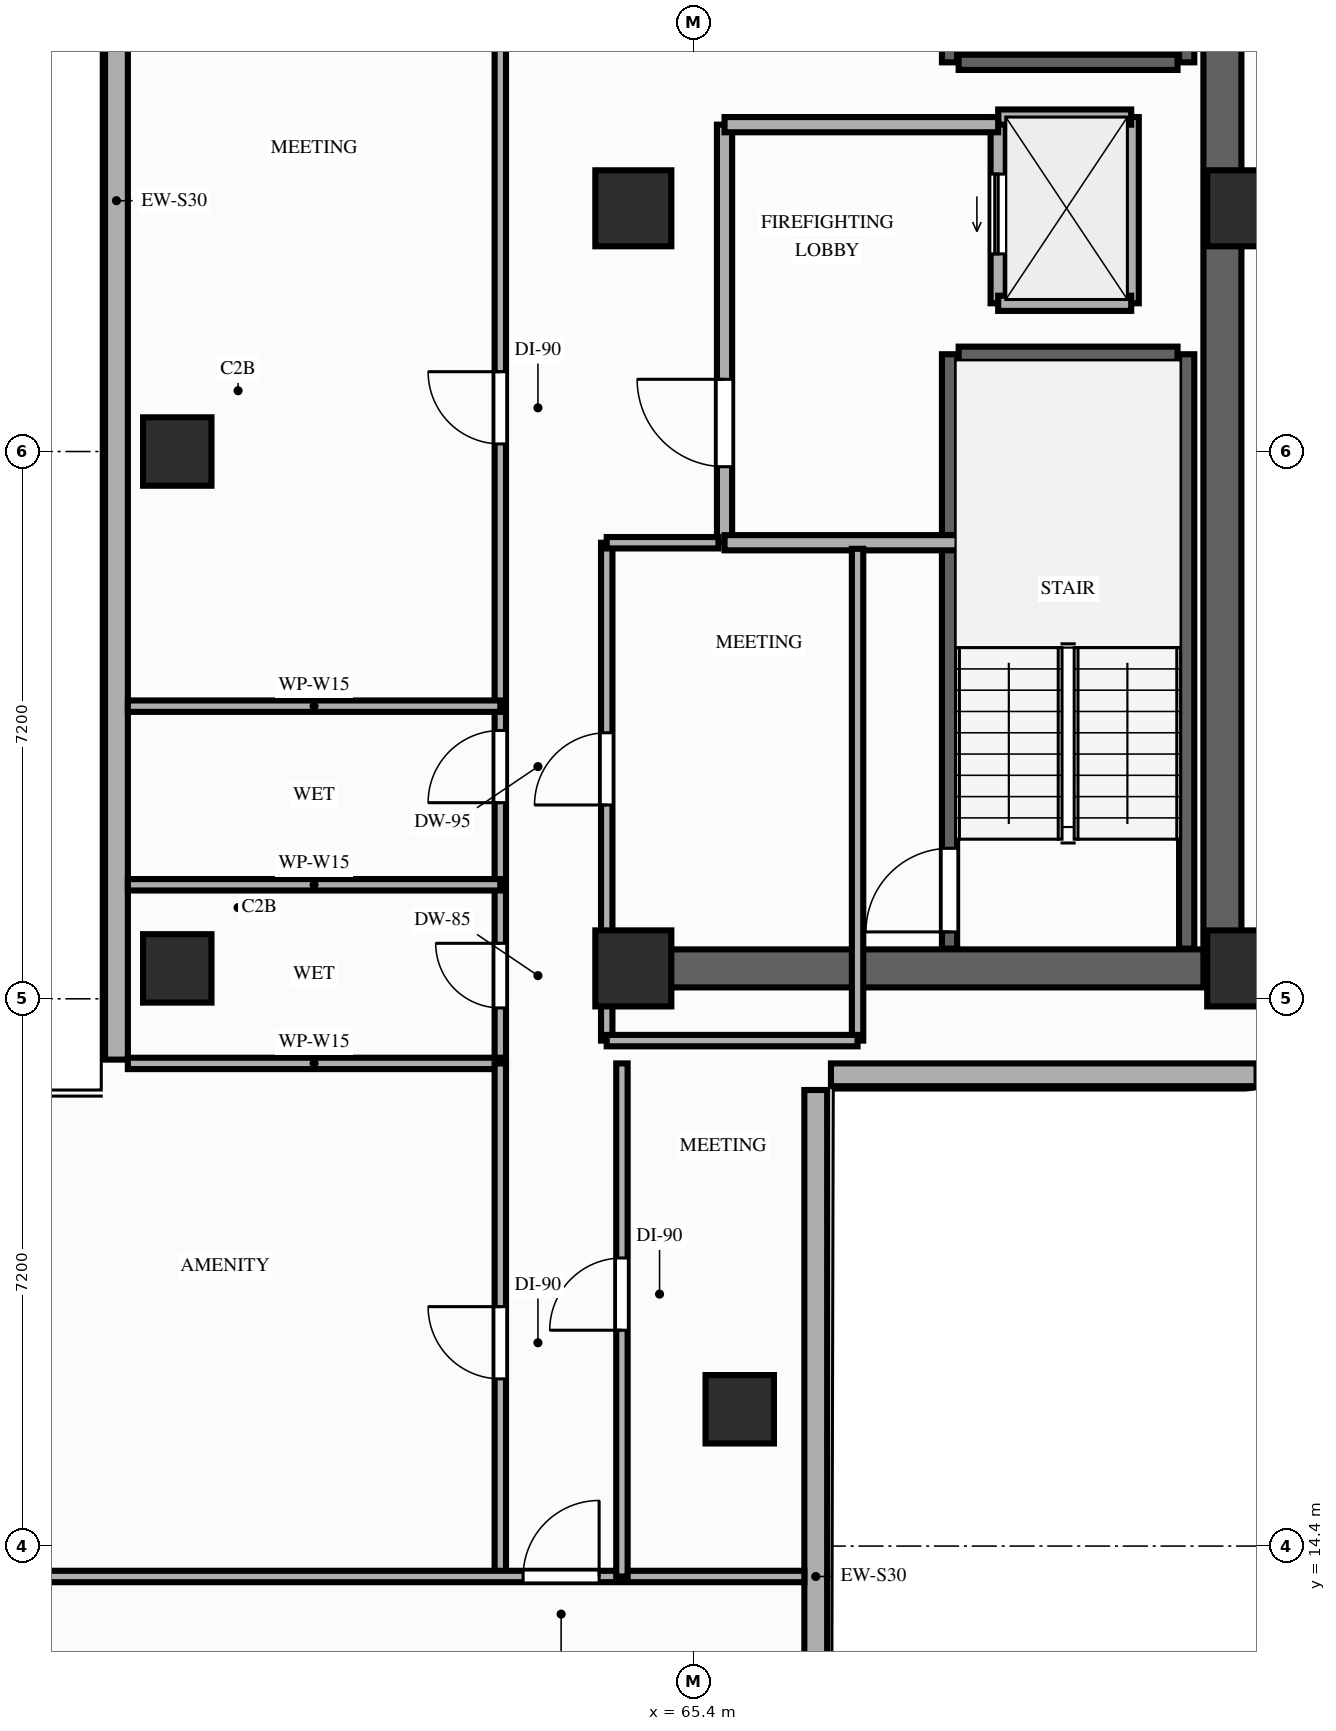
"""IFC4 building model, lengths in metres.
Left out: names, types, materials, properties, quantities, classifications, styles, units other than length and angle.
Written with IfcOpenShell. Run it as: python <this file> out.ifc"""

import sys

from ifc_helpers import new_model, si_unit, direction, frame, frame_2d, origin, origin_2d, place, context, subcontext, project, spatial, rectangle, extrude, element, fill, save


model = new_model("IFC4")
c1 = context("Model", 3, precision=1e-05, world=origin(), true_north=direction((0.0, 1.0)))
c2 = subcontext(c1, "Body", "Model", "MODEL_VIEW")
j1 = project(units=[si_unit("LENGTHUNIT", "METRE"), si_unit("PLANEANGLEUNIT", "RADIAN")], contexts=[c1])
p1 = place(None, origin())
s1 = spatial("IfcSite", under=j1, at=p1, CompositionType="ELEMENT")
p2 = place(p1, origin())
s2 = spatial("IfcBuilding", under=s1, at=p2, CompositionType="ELEMENT")
p3 = place(p2, frame((0.0, 0.0, 69.2)))
s3 = spatial("IfcBuildingStorey", under=s2, at=p3, CompositionType="ELEMENT", Elevation=69.2)
for number, where, z_axis, x_axis in (
    (1, (64.6, 22.0, 0.0), (0.0, 0.0, 1.0), (1.0, 0.0, 0.0)),
    (2, (72.65, 22.0, 0.0), (0.0, 0.0, 1.0), (1.0, 0.0, 0.0)),
    (3, (64.6, 32.0, 0.0), (0.0, 0.0, 1.0), (1.0, 0.0, 0.0)),
    (4, (72.65, 32.0, 0.0), (0.0, 0.0, 1.0), (1.0, 0.0, 0.0)),
):
    element("IfcColumn", number, at=place(p3, frame(where, z_axis=z_axis, x_axis=x_axis)), inside=s3, PredefinedType="COLUMN", context=c2, shape_type="SweptSolid", body=[
        extrude(rectangle(XDim=1.0, YDim=1.0, at=origin_2d()), origin(), (0.0, 0.0, 1.0), 3.2),
    ])
for number, where, z_axis, x_axis in (
    (5, (58.6, 22.0, 0.0), (0.0, 0.0, 1.0), (1.0, 0.0, 0.0)),
    (6, (58.6, 28.8, 0.0), (0.0, 0.0, 1.0), (1.0, 0.0, 0.0)),
    (7, (66.0, 16.2, 0.0), (0.0, 0.0, 1.0), (1.0, 0.0, 0.0)),
):
    element("IfcColumn", number, at=place(p3, frame(where, z_axis=z_axis, x_axis=x_axis)), inside=s3, PredefinedType="COLUMN", context=c2, shape_type="SweptSolid", body=[
        extrude(rectangle(XDim=0.9, YDim=0.9, at=origin_2d()), origin(), (0.0, 0.0, 1.0), 3.2),
    ])
p4 = place(p3, frame((57.8, 43.4, 0.0), z_axis=(0.0, 0.0, 1.0), x_axis=(0.0, -1.0, 0.0)))
e8 = element("IfcWall", 8, at=p4, inside=s3, PredefinedType="STANDARD", context=c2, shape_type="SweptSolid", body=[
    extrude(rectangle(XDim=22.6, YDim=0.3, at=frame_2d((11.3, 0.0))), origin(), (0.0, 0.0, 1.0), 2.6),
])
p5 = place(p4, frame((3.6, 0.0, 0.85)))
e9 = element("IfcOpeningElement", 9, at=p5, cuts=e8, PredefinedType="OPENING", context=c2, shape_type="SweptSolid", body=[
    extrude(rectangle(XDim=1.6, YDim=1.45, at=frame_2d((0.8, 0.725))), frame((0.0, 0.16, 0.0), z_axis=(0.0, -1.0, 0.0), x_axis=(1.0, 0.0, 0.0)), (0.0, 0.0, 1.0), 0.32),
])
p6 = place(p3, frame((67.0, 7.6, 0.0), z_axis=(0.0, 0.0, 1.0), x_axis=(0.0, 1.0, 0.0)))
e10 = element("IfcWall", 10, at=p6, inside=s3, PredefinedType="STANDARD", context=c2, shape_type="SweptSolid", body=[
    extrude(rectangle(XDim=12.8, YDim=0.3, at=frame_2d((6.4, 0.0))), origin(), (0.0, 0.0, 1.0), 3.02),
])
p7 = place(p3, frame((67.2, 20.6, 0.0), z_axis=(0.0, 0.0, 1.0), x_axis=(1.0, 0.0, 0.0)))
e11 = element("IfcWall", 11, at=p7, inside=s3, PredefinedType="STANDARD", context=c2, shape_type="SweptSolid", body=[
    extrude(rectangle(XDim=5.6, YDim=0.3, at=frame_2d((2.8, 0.0))), origin(), (0.0, 0.0, 1.0), 3.02),
])
p8 = place(p3, frame((72.35, 22.0, 0.0), z_axis=(0.0, 0.0, 1.0), x_axis=(0.0, 1.0, 0.0)))
e12 = element("IfcWall", 12, at=p8, inside=s3, PredefinedType="SHEAR", context=c2, shape_type="SweptSolid", body=[
    extrude(rectangle(XDim=20.25, YDim=0.5, at=frame_2d((10.125, 0.0))), origin(), (0.0, 0.0, 1.0), 3.02),
])
p9 = place(p3, frame((64.6, 22.0, 0.0), z_axis=(0.0, 0.0, 1.0), x_axis=(1.0, 0.0, 0.0)))
e13 = element("IfcWall", 13, at=p9, inside=s3, PredefinedType="SHEAR", context=c2, shape_type="SweptSolid", body=[
    extrude(rectangle(XDim=7.5, YDim=0.5, at=frame_2d((3.75, 0.0))), origin(), (0.0, 0.0, 1.0), 3.02),
])
p10 = place(p3, frame((68.76, 22.26, 0.0), z_axis=(0.0, 0.0, 1.0), x_axis=(0.0, 1.0, 0.0)))
e14 = element("IfcWall", 14, at=p10, inside=s3, PredefinedType="SHEAR", context=c2, shape_type="SweptSolid", body=[
    extrude(rectangle(XDim=7.82, YDim=0.2, at=frame_2d((3.91, 0.0))), origin(), (0.0, 0.0, 1.0), 3.02),
])
p11 = place(p10, frame((0.22, 0.0, 0.0)))
e15 = element("IfcOpeningElement", 15, at=p11, cuts=e14, PredefinedType="OPENING", context=c2, shape_type="SweptSolid", body=[
    extrude(rectangle(XDim=1.1, YDim=2.15, at=frame_2d((0.55, 1.075))), frame((0.0, 0.11, 0.0), z_axis=(0.0, -1.0, 0.0), x_axis=(1.0, 0.0, 0.0)), (0.0, 0.0, 1.0), 0.22),
])
p12 = place(p3, frame((71.88, 22.26, 0.0), z_axis=(0.0, 0.0, 1.0), x_axis=(0.0, 1.0, 0.0)))
e16 = element("IfcWall", 16, at=p12, inside=s3, PredefinedType="SHEAR", context=c2, shape_type="SweptSolid", body=[
    extrude(rectangle(XDim=7.82, YDim=0.2, at=frame_2d((3.91, 0.0))), origin(), (0.0, 0.0, 1.0), 3.02),
])
p13 = place(p3, frame((68.88, 30.08, 0.0), z_axis=(0.0, 0.0, 1.0), x_axis=(1.0, 0.0, 0.0)))
e17 = element("IfcWall", 17, at=p13, inside=s3, PredefinedType="SHEAR", context=c2, shape_type="SweptSolid", body=[
    extrude(rectangle(XDim=2.88, YDim=0.2, at=frame_2d((1.44, 0.0))), origin(), (0.0, 0.0, 1.0), 3.02),
])
p14 = place(p3, frame((68.76, 33.92, 0.0), z_axis=(0.0, 0.0, 1.0), x_axis=(0.0, 1.0, 0.0)))
e18 = element("IfcWall", 18, at=p14, inside=s3, PredefinedType="SHEAR", context=c2, shape_type="SweptSolid", body=[
    extrude(rectangle(XDim=7.96, YDim=0.2, at=frame_2d((3.98, 0.0))), origin(), (0.0, 0.0, 1.0), 3.02),
])
p15 = place(p14, frame((0.22, 0.0, 0.0)))
e19 = element("IfcOpeningElement", 19, at=p15, cuts=e18, PredefinedType="OPENING", context=c2, shape_type="SweptSolid", body=[
    extrude(rectangle(XDim=1.1, YDim=2.15, at=frame_2d((0.55, 1.075))), frame((0.0, 0.11, 0.0), z_axis=(0.0, -1.0, 0.0), x_axis=(1.0, 0.0, 0.0)), (0.0, 0.0, 1.0), 0.22),
])
p16 = place(p3, frame((71.88, 33.92, 0.0), z_axis=(0.0, 0.0, 1.0), x_axis=(0.0, 1.0, 0.0)))
e20 = element("IfcWall", 20, at=p16, inside=s3, PredefinedType="SHEAR", context=c2, shape_type="SweptSolid", body=[
    extrude(rectangle(XDim=7.96, YDim=0.2, at=frame_2d((3.98, 0.0))), origin(), (0.0, 0.0, 1.0), 3.02),
])
p17 = place(p3, frame((68.88, 33.92, 0.0), z_axis=(0.0, 0.0, 1.0), x_axis=(1.0, 0.0, 0.0)))
e21 = element("IfcWall", 21, at=p17, inside=s3, PredefinedType="SHEAR", context=c2, shape_type="SweptSolid", body=[
    extrude(rectangle(XDim=2.88, YDim=0.2, at=frame_2d((1.44, 0.0))), origin(), (0.0, 0.0, 1.0), 3.02),
])
p18 = place(p3, frame((69.4, 30.75, 0.0), z_axis=(0.0, 0.0, 1.0), x_axis=(0.0, 1.0, 0.0)))
e22 = element("IfcWall", 22, at=p18, inside=s3, PredefinedType="MOVABLE", context=c2, shape_type="SweptSolid", body=[
    extrude(rectangle(XDim=2.45, YDim=0.2, at=frame_2d((1.225, 0.0))), origin(), (0.0, 0.0, 1.0), 3.02),
])
p19 = place(p18, frame((0.65, 0.0, 0.0)))
e23 = element("IfcOpeningElement", 23, at=p19, cuts=e22, PredefinedType="OPENING", context=c2, shape_type="SweptSolid", body=[
    extrude(rectangle(XDim=1.05, YDim=2.15, at=frame_2d((0.525, 1.075))), frame((0.0, 0.11, 0.0), z_axis=(0.0, -1.0, 0.0), x_axis=(1.0, 0.0, 0.0)), (0.0, 0.0, 1.0), 0.22),
])
p20 = place(p3, frame((71.15, 30.75, 0.0), z_axis=(0.0, 0.0, 1.0), x_axis=(0.0, 1.0, 0.0)))
e24 = element("IfcWall", 24, at=p20, inside=s3, PredefinedType="MOVABLE", context=c2, shape_type="SweptSolid", body=[
    extrude(rectangle(XDim=2.45, YDim=0.2, at=frame_2d((1.225, 0.0))), origin(), (0.0, 0.0, 1.0), 3.02),
])
for number, where, z_axis, x_axis in (
    (25, (69.4, 33.2, 0.0), (0.0, 0.0, 1.0), (1.0, 0.0, 0.0)),
    (26, (69.4, 30.75, 0.0), (0.0, 0.0, 1.0), (1.0, 0.0, 0.0)),
):
    element("IfcWall", number, at=place(p3, frame(where, z_axis=z_axis, x_axis=x_axis)), inside=s3, PredefinedType="MOVABLE", context=c2, shape_type="SweptSolid", body=[
        extrude(rectangle(XDim=1.75, YDim=0.2, at=frame_2d((0.875, 0.0))), origin(), (0.0, 0.0, 1.0), 3.02),
    ])
p21 = place(p3, frame((65.8, 27.6, 0.0), z_axis=(0.0, 0.0, 1.0), x_axis=(0.0, 1.0, 0.0)))
e27 = element("IfcWall", 27, at=p21, inside=s3, PredefinedType="PARTITIONING", context=c2, shape_type="SweptSolid", body=[
    extrude(rectangle(XDim=5.5, YDim=0.2, at=frame_2d((2.75, 0.0))), origin(), (0.0, 0.0, 1.0), 3.02),
])
p22 = place(p21, frame((1.0, 0.0, 0.0)))
e28 = element("IfcOpeningElement", 28, at=p22, cuts=e27, PredefinedType="OPENING", context=c2, shape_type="SweptSolid", body=[
    extrude(rectangle(XDim=1.15, YDim=2.15, at=frame_2d((0.575, 1.075))), frame((0.0, 0.11, 0.0), z_axis=(0.0, -1.0, 0.0), x_axis=(1.0, 0.0, 0.0)), (0.0, 0.0, 1.0), 0.22),
])
p23 = place(p3, frame((65.8, 33.1, 0.0), z_axis=(0.0, 0.0, 1.0), x_axis=(1.0, 0.0, 0.0)))
e29 = element("IfcWall", 29, at=p23, inside=s3, PredefinedType="PARTITIONING", context=c2, shape_type="SweptSolid", body=[
    extrude(rectangle(XDim=3.6, YDim=0.2, at=frame_2d((1.8, 0.0))), origin(), (0.0, 0.0, 1.0), 3.02),
])
p24 = place(p3, frame((65.8, 27.6, 0.0), z_axis=(0.0, 0.0, 1.0), x_axis=(1.0, 0.0, 0.0)))
e30 = element("IfcWall", 30, at=p24, inside=s3, PredefinedType="PARTITIONING", context=c2, shape_type="SweptSolid", body=[
    extrude(rectangle(XDim=3.4, YDim=0.2, at=frame_2d((1.7, 0.0))), origin(), (0.0, 0.0, 1.0), 3.02),
])
p25 = place(p3, frame((64.25, 21.05, 0.0), z_axis=(0.0, 0.0, 1.0), x_axis=(0.0, 1.0, 0.0)))
e31 = element("IfcWall", 31, at=p25, inside=s3, PredefinedType="PARTITIONING", context=c2, shape_type="SweptSolid", body=[
    extrude(rectangle(XDim=6.55, YDim=0.15, at=frame_2d((3.275, 0.0))), origin(), (0.0, 0.0, 1.0), 2.6),
])
p26 = place(p25, frame((3.1, 0.0, 0.0)))
e32 = element("IfcOpeningElement", 32, at=p26, cuts=e31, PredefinedType="OPENING", context=c2, shape_type="SweptSolid", body=[
    extrude(rectangle(XDim=0.95, YDim=2.15, at=frame_2d((0.475, 1.075))), frame((0.0, 0.085, 0.0), z_axis=(0.0, -1.0, 0.0), x_axis=(1.0, 0.0, 0.0)), (0.0, 0.0, 1.0), 0.17),
])
p27 = place(p3, frame((67.55, 21.05, 0.0), z_axis=(0.0, 0.0, 1.0), x_axis=(0.0, 1.0, 0.0)))
e33 = element("IfcWall", 33, at=p27, inside=s3, PredefinedType="PARTITIONING", context=c2, shape_type="SweptSolid", body=[
    extrude(rectangle(XDim=6.47, YDim=0.15, at=frame_2d((3.235, 0.0))), origin(), (0.0, 0.0, 1.0), 2.6),
])
p28 = place(p3, frame((64.25, 21.05, 0.0), z_axis=(0.0, 0.0, 1.0), x_axis=(1.0, 0.0, 0.0)))
e34 = element("IfcWall", 34, at=p28, inside=s3, PredefinedType="PARTITIONING", context=c2, shape_type="SweptSolid", body=[
    extrude(rectangle(XDim=3.3, YDim=0.15, at=frame_2d((1.65, 0.0))), origin(), (0.0, 0.0, 1.0), 2.6),
])
p29 = place(p3, frame((64.25, 27.6, 0.0), z_axis=(0.0, 0.0, 1.0), x_axis=(1.0, 0.0, 0.0)))
e35 = element("IfcWall", 35, at=p29, inside=s3, PredefinedType="PARTITIONING", context=c2, shape_type="SweptSolid", body=[
    extrude(rectangle(XDim=1.47, YDim=0.15, at=frame_2d((0.735, 0.0))), origin(), (0.0, 0.0, 1.0), 2.6),
])
p30 = place(p3, frame((62.85, 20.75, 0.0), z_axis=(0.0, 0.0, 1.0), x_axis=(0.0, 1.0, 0.0)))
e36 = element("IfcWall", 36, at=p30, inside=s3, PredefinedType="PARTITIONING", context=c2, shape_type="SweptSolid", body=[
    extrude(rectangle(XDim=22.7, YDim=0.15, at=frame_2d((11.35, 0.0))), origin(), (0.0, 0.0, 1.0), 2.6),
])
p31 = place(p30, frame((0.73, 0.0, 0.0)))
e37 = element("IfcOpeningElement", 37, at=p31, cuts=e36, PredefinedType="OPENING", context=c2, shape_type="SweptSolid", body=[
    extrude(rectangle(XDim=0.85, YDim=2.1, at=frame_2d((0.425, 1.05))), frame((0.0, 0.085, 0.0), z_axis=(0.0, -1.0, 0.0), x_axis=(1.0, 0.0, 0.0)), (0.0, 0.0, 1.0), 0.17),
])
p32 = place(p30, frame((3.43, 0.0, 0.0)))
e38 = element("IfcOpeningElement", 38, at=p32, cuts=e36, PredefinedType="OPENING", context=c2, shape_type="SweptSolid", body=[
    extrude(rectangle(XDim=0.95, YDim=2.1, at=frame_2d((0.475, 1.05))), frame((0.0, 0.085, 0.0), z_axis=(0.0, -1.0, 0.0), x_axis=(1.0, 0.0, 0.0)), (0.0, 0.0, 1.0), 0.17),
])
p33 = place(p30, frame((8.15, 0.0, 0.0)))
e39 = element("IfcOpeningElement", 39, at=p33, cuts=e36, PredefinedType="OPENING", context=c2, shape_type="SweptSolid", body=[
    extrude(rectangle(XDim=0.95, YDim=2.15, at=frame_2d((0.475, 1.075))), frame((0.0, 0.085, 0.0), z_axis=(0.0, -1.0, 0.0), x_axis=(1.0, 0.0, 0.0)), (0.0, 0.0, 1.0), 0.17),
])
p34 = place(p30, frame((18.89, 0.0, 0.0)))
e40 = element("IfcOpeningElement", 40, at=p34, cuts=e36, PredefinedType="OPENING", context=c2, shape_type="SweptSolid", body=[
    extrude(rectangle(XDim=0.95, YDim=2.15, at=frame_2d((0.475, 1.075))), frame((0.0, 0.085, 0.0), z_axis=(0.0, -1.0, 0.0), x_axis=(1.0, 0.0, 0.0)), (0.0, 0.0, 1.0), 0.17),
])
for number, where, z_axis, x_axis in (
    (41, (57.95, 20.75, 0.0), (0.0, 0.0, 1.0), (1.0, 0.0, 0.0)),
    (42, (57.95, 23.1, 0.0), (0.0, 0.0, 1.0), (1.0, 0.0, 0.0)),
    (43, (57.95, 25.45, 0.0), (0.0, 0.0, 1.0), (1.0, 0.0, 0.0)),
):
    element("IfcWall", number, at=place(p3, frame(where, z_axis=z_axis, x_axis=x_axis)), inside=s3, PredefinedType="PARTITIONING", context=c2, shape_type="SweptSolid", body=[
        extrude(rectangle(XDim=4.9, YDim=0.15, at=frame_2d((2.45, 0.0))), origin(), (0.0, 0.0, 1.0), 2.6),
    ])
p35 = place(p3, frame((62.85, 14.0, 0.0), z_axis=(0.0, 0.0, 1.0), x_axis=(0.0, 1.0, 0.0)))
e44 = element("IfcWall", 44, at=p35, inside=s3, PredefinedType="PARTITIONING", context=c2, shape_type="SweptSolid", body=[
    extrude(rectangle(XDim=6.75, YDim=0.15, at=frame_2d((3.375, 0.0))), origin(), (0.0, 0.0, 1.0), 2.6),
])
p36 = place(p35, frame((2.6, 0.0, 0.0)))
e45 = element("IfcOpeningElement", 45, at=p36, cuts=e44, PredefinedType="OPENING", context=c2, shape_type="SweptSolid", body=[
    extrude(rectangle(XDim=0.95, YDim=2.15, at=frame_2d((0.475, 1.075))), frame((0.0, 0.085, 0.0), z_axis=(0.0, -1.0, 0.0), x_axis=(1.0, 0.0, 0.0)), (0.0, 0.0, 1.0), 0.17),
])
p37 = place(p3, frame((55.55, 14.0, 0.0), z_axis=(0.0, 0.0, 1.0), x_axis=(1.0, 0.0, 0.0)))
e46 = element("IfcWall", 46, at=p37, inside=s3, PredefinedType="PARTITIONING", context=c2, shape_type="SweptSolid", body=[
    extrude(rectangle(XDim=11.3, YDim=0.15, at=frame_2d((5.65, 0.0))), origin(), (0.0, 0.0, 1.0), 2.6),
])
p38 = place(p37, frame((7.6, 0.0, 0.0)))
e47 = element("IfcOpeningElement", 47, at=p38, cuts=e46, PredefinedType="OPENING", context=c2, shape_type="SweptSolid", body=[
    extrude(rectangle(XDim=1.0, YDim=2.15, at=frame_2d((0.5, 1.075))), frame((0.0, 0.085, 0.0), z_axis=(0.0, -1.0, 0.0), x_axis=(1.0, 0.0, 0.0)), (0.0, 0.0, 1.0), 0.17),
])
p39 = place(p3, frame((64.45, 14.0, 0.0), z_axis=(0.0, 0.0, 1.0), x_axis=(0.0, 1.0, 0.0)))
e48 = element("IfcWall", 48, at=p39, inside=s3, PredefinedType="PARTITIONING", context=c2, shape_type="SweptSolid", body=[
    extrude(rectangle(XDim=6.75, YDim=0.15, at=frame_2d((3.375, 0.0))), origin(), (0.0, 0.0, 1.0), 2.6),
])
p40 = place(p39, frame((3.24, 0.0, 0.0)))
e49 = element("IfcOpeningElement", 49, at=p40, cuts=e48, PredefinedType="OPENING", context=c2, shape_type="SweptSolid", body=[
    extrude(rectangle(XDim=0.95, YDim=2.15, at=frame_2d((0.475, 1.075))), frame((0.0, 0.085, 0.0), z_axis=(0.0, -1.0, 0.0), x_axis=(1.0, 0.0, 0.0)), (0.0, 0.0, 1.0), 0.17),
])
p41 = place(p11, origin())
e50 = element("IfcDoor", 50, at=p41, inside=s3, OperationType="SINGLE_SWING_LEFT", PredefinedType="DOOR", context=c2, shape_type="SweptSolid", body=[
    extrude(rectangle(XDim=1.1, YDim=2.15, at=frame_2d((0.55, 1.075))), frame((0.0, 0.025, 0.0), z_axis=(0.0, -1.0, 0.0), x_axis=(1.0, 0.0, 0.0)), (0.0, 0.0, 1.0), 0.05),
])
fill(e15, e50)
p42 = place(p19, origin())
e51 = element("IfcDoor", 51, at=p42, inside=s3, OperationType="SLIDING_TO_LEFT", PredefinedType="DOOR", context=c2, shape_type="SweptSolid", body=[
    extrude(rectangle(XDim=1.05, YDim=2.15, at=frame_2d((0.525, 1.075))), frame((0.0, 0.025, 0.0), z_axis=(0.0, -1.0, 0.0), x_axis=(1.0, 0.0, 0.0)), (0.0, 0.0, 1.0), 0.05),
])
fill(e23, e51)
p43 = place(p22, origin())
e52 = element("IfcDoor", 52, at=p43, inside=s3, OperationType="SINGLE_SWING_RIGHT", PredefinedType="DOOR", context=c2, shape_type="SweptSolid", body=[
    extrude(rectangle(XDim=1.15, YDim=2.15, at=frame_2d((0.575, 1.075))), frame((0.0, 0.025, 0.0), z_axis=(0.0, -1.0, 0.0), x_axis=(1.0, 0.0, 0.0)), (0.0, 0.0, 1.0), 0.05),
])
fill(e28, e52)
p44 = place(p26, origin())
e53 = element("IfcDoor", 53, at=p44, inside=s3, OperationType="SINGLE_SWING_LEFT", PredefinedType="DOOR", context=c2, shape_type="SweptSolid", body=[
    extrude(rectangle(XDim=0.95, YDim=2.15, at=frame_2d((0.475, 1.075))), frame((0.0, 0.025, 0.0), z_axis=(0.0, -1.0, 0.0), x_axis=(1.0, 0.0, 0.0)), (0.0, 0.0, 1.0), 0.05),
])
fill(e32, e53)
p45 = place(p31, origin())
e54 = element("IfcDoor", 54, at=p45, inside=s3, OperationType="SINGLE_SWING_RIGHT", PredefinedType="DOOR", context=c2, shape_type="SweptSolid", body=[
    extrude(rectangle(XDim=0.85, YDim=2.1, at=frame_2d((0.425, 1.05))), frame((0.0, 0.025, 0.0), z_axis=(0.0, -1.0, 0.0), x_axis=(1.0, 0.0, 0.0)), (0.0, 0.0, 1.0), 0.05),
])
fill(e37, e54)
p46 = place(p32, origin())
e55 = element("IfcDoor", 55, at=p46, inside=s3, OperationType="SINGLE_SWING_LEFT", PredefinedType="DOOR", context=c2, shape_type="SweptSolid", body=[
    extrude(rectangle(XDim=0.95, YDim=2.1, at=frame_2d((0.475, 1.05))), frame((0.0, 0.025, 0.0), z_axis=(0.0, -1.0, 0.0), x_axis=(1.0, 0.0, 0.0)), (0.0, 0.0, 1.0), 0.05),
])
fill(e38, e55)
p47 = place(p33, origin())
e56 = element("IfcDoor", 56, at=p47, inside=s3, OperationType="SINGLE_SWING_RIGHT", PredefinedType="DOOR", context=c2, shape_type="SweptSolid", body=[
    extrude(rectangle(XDim=0.95, YDim=2.15, at=frame_2d((0.475, 1.075))), frame((0.0, 0.025, 0.0), z_axis=(0.0, -1.0, 0.0), x_axis=(1.0, 0.0, 0.0)), (0.0, 0.0, 1.0), 0.05),
])
fill(e39, e56)
p48 = place(p36, origin())
e57 = element("IfcDoor", 57, at=p48, inside=s3, OperationType="SINGLE_SWING_RIGHT", PredefinedType="DOOR", context=c2, shape_type="SweptSolid", body=[
    extrude(rectangle(XDim=0.95, YDim=2.15, at=frame_2d((0.475, 1.075))), frame((0.0, 0.025, 0.0), z_axis=(0.0, -1.0, 0.0), x_axis=(1.0, 0.0, 0.0)), (0.0, 0.0, 1.0), 0.05),
])
fill(e45, e57)
p49 = place(p40, origin())
e58 = element("IfcDoor", 58, at=p49, inside=s3, OperationType="SINGLE_SWING_LEFT", PredefinedType="DOOR", context=c2, shape_type="SweptSolid", body=[
    extrude(rectangle(XDim=0.95, YDim=2.15, at=frame_2d((0.475, 1.075))), frame((0.0, 0.025, 0.0), z_axis=(0.0, -1.0, 0.0), x_axis=(1.0, 0.0, 0.0)), (0.0, 0.0, 1.0), 0.05),
])
fill(e49, e58)
p50 = place(p38, origin())
e59 = element("IfcDoor", 59, at=p50, inside=s3, OperationType="SINGLE_SWING_RIGHT", PredefinedType="DOOR", context=c2, shape_type="SweptSolid", body=[
    extrude(rectangle(XDim=1.0, YDim=2.15, at=frame_2d((0.5, 1.075))), frame((0.0, 0.025, 0.0), z_axis=(0.0, -1.0, 0.0), x_axis=(1.0, 0.0, 0.0)), (0.0, 0.0, 1.0), 0.05),
])
fill(e47, e59)
save(model, sys.argv[1])
